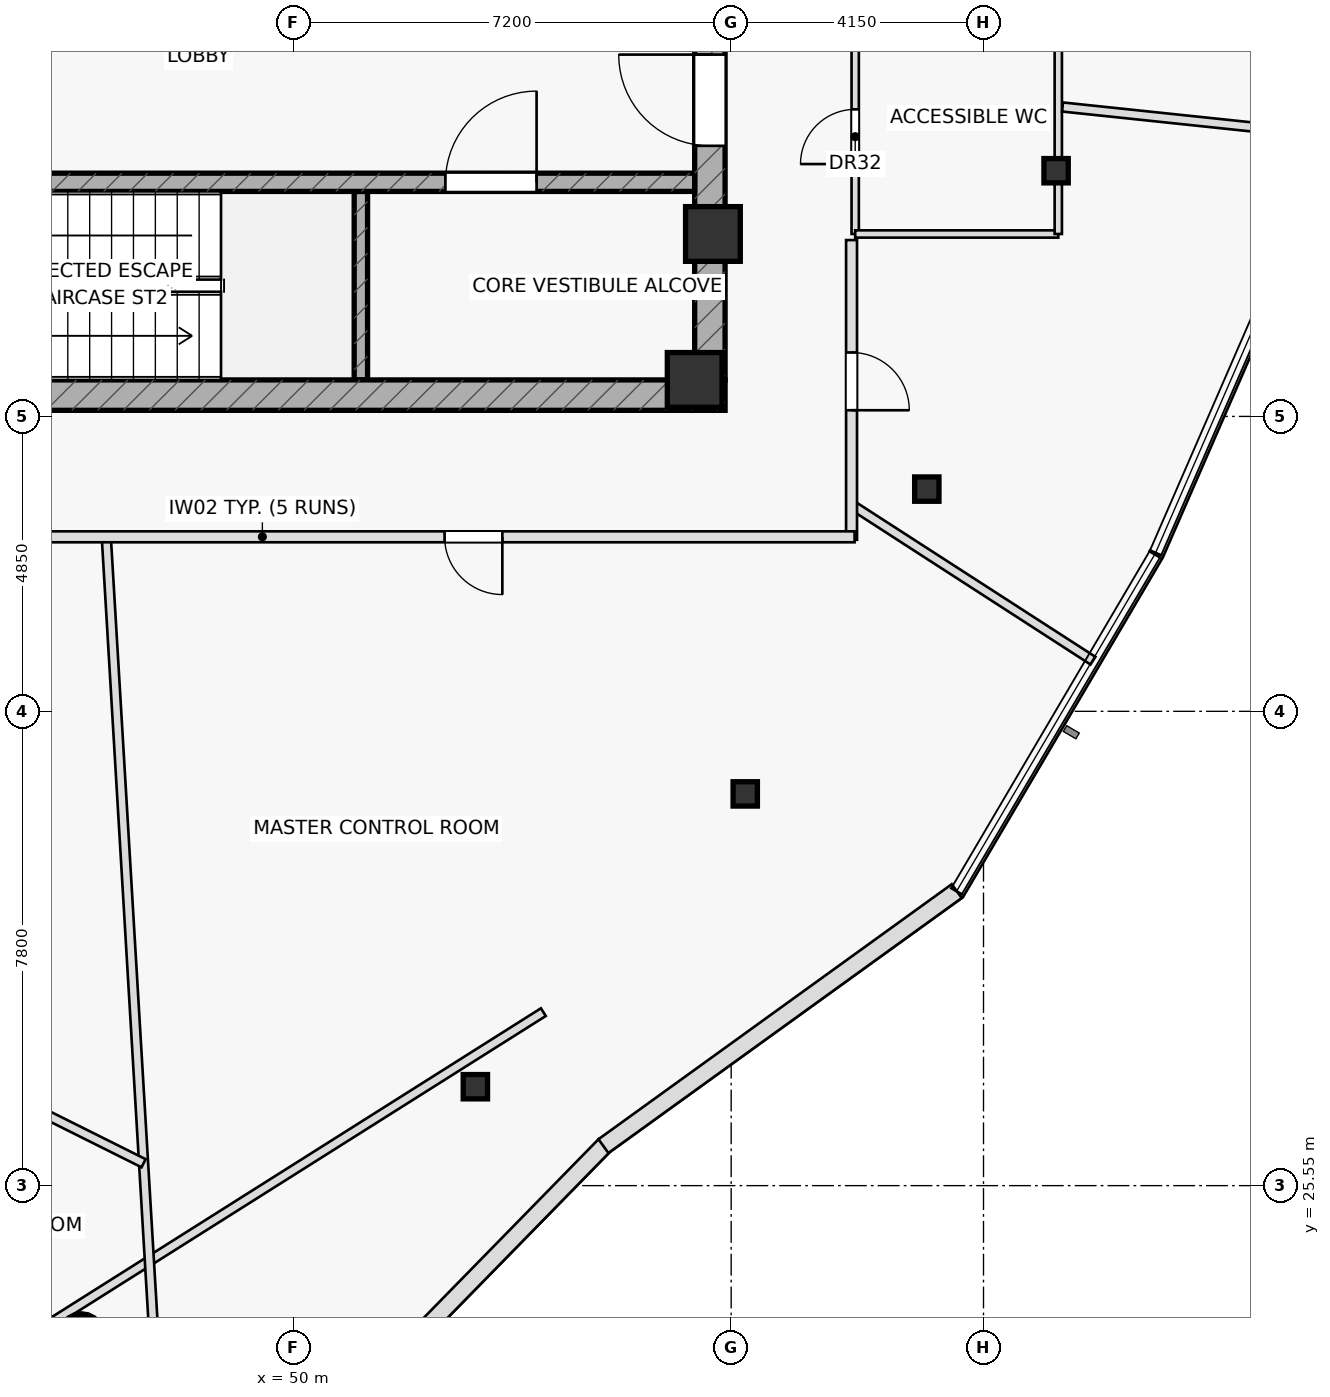
"""IFC4 building model, lengths in metres.
Left out: names, types, materials, properties, quantities, classifications, styles, units other than length and angle.
Written with IfcOpenShell. Run it as: python <this file> out.ifc"""

import sys

from ifc_helpers import new_model, si_unit, direction, frame, frame_2d, origin, origin_2d, place, context, subcontext, project, spatial, rectangle, hollow_rectangle, hollow_circle, extrude, element, fill, save


model = new_model("IFC4")
c1 = context("Model", 3, precision=1e-05, world=origin(), true_north=direction((0.0, 1.0)))
c2 = subcontext(c1, "Body", "Model", "MODEL_VIEW")
j1 = project(units=[si_unit("LENGTHUNIT", "METRE"), si_unit("PLANEANGLEUNIT", "RADIAN")], contexts=[c1])
p1 = place(None, origin())
s1 = spatial("IfcSite", under=j1, at=p1, CompositionType="ELEMENT")
p2 = place(p1, origin())
s2 = spatial("IfcBuilding", under=s1, at=p2, CompositionType="ELEMENT")
p3 = place(p2, frame((0.0, 0.0, 309.5)))
s3 = spatial("IfcBuildingStorey", under=s2, at=p3, CompositionType="ELEMENT", Elevation=309.5)
p4 = place(p3, frame((51.11, 38.8, 0.0), z_axis=(0.0, 0.0, 1.0), x_axis=(0.0, 1.0, 0.0)))
e1 = element("IfcWall", 1, at=p4, inside=s3, PredefinedType="SHEAR", context=c2, shape_type="SweptSolid", body=[
    extrude(rectangle(XDim=3.1, YDim=0.22, at=frame_2d((1.55, 0.0))), origin(), (0.0, 0.0, 1.0), 3.7),
])
p5 = place(p3, frame((42.9, 38.55, 0.0), z_axis=(0.0, 0.0, 1.0), x_axis=(1.0, 0.0, 0.0)))
e2 = element("IfcWall", 2, at=p5, inside=s3, PredefinedType="SHEAR", context=c2, shape_type="SweptSolid", body=[
    extrude(rectangle(XDim=14.2, YDim=0.5, at=frame_2d((7.1, 0.0))), origin(), (0.0, 0.0, 1.0), 3.7),
])
p6 = place(p5, frame((0.78, 0.0, 0.0)))
e3 = element("IfcOpeningElement", 3, at=p6, cuts=e2, PredefinedType="OPENING", context=c2, shape_type="SweptSolid", body=[
    extrude(rectangle(XDim=1.05, YDim=2.2, at=frame_2d((0.525, 1.1))), frame((0.0, 0.26, 0.0), z_axis=(0.0, -1.0, 0.0), x_axis=(1.0, 0.0, 0.0)), (0.0, 0.0, 1.0), 0.52),
])
p7 = place(p3, frame((56.85, 38.8, 0.0), z_axis=(0.0, 0.0, 1.0), x_axis=(0.0, 1.0, 0.0)))
e4 = element("IfcWall", 4, at=p7, inside=s3, PredefinedType="SHEAR", context=c2, shape_type="SweptSolid", body=[
    extrude(rectangle(XDim=12.4, YDim=0.5, at=frame_2d((6.2, 0.0))), origin(), (0.0, 0.0, 1.0), 3.7),
])
p8 = place(p7, frame((3.85, 0.0, 0.0)))
e5 = element("IfcOpeningElement", 5, at=p8, cuts=e4, PredefinedType="OPENING", context=c2, shape_type="SweptSolid", body=[
    extrude(rectangle(XDim=1.5, YDim=2.2, at=frame_2d((0.75, 1.1))), frame((0.0, 0.26, 0.0), z_axis=(0.0, -1.0, 0.0), x_axis=(1.0, 0.0, 0.0)), (0.0, 0.0, 1.0), 0.52),
])
p9 = place(p3, frame((43.4, 42.05, 0.0), z_axis=(0.0, 0.0, 1.0), x_axis=(1.0, 0.0, 0.0)))
e6 = element("IfcWall", 6, at=p9, inside=s3, PredefinedType="SHEAR", context=c2, shape_type="SweptSolid", body=[
    extrude(rectangle(XDim=13.2, YDim=0.3, at=frame_2d((6.6, 0.0))), origin(), (0.0, 0.0, 1.0), 3.7),
])
p10 = place(p9, frame((9.1, 0.0, 0.0)))
e7 = element("IfcOpeningElement", 7, at=p10, cuts=e6, PredefinedType="OPENING", context=c2, shape_type="SweptSolid", body=[
    extrude(rectangle(XDim=1.5, YDim=2.2, at=frame_2d((0.75, 1.1))), frame((0.0, 0.16, 0.0), z_axis=(0.0, -1.0, 0.0), x_axis=(1.0, 0.0, 0.0)), (0.0, 0.0, 1.0), 0.32),
])
for number, where, z_axis, x_axis in (
    (8, (56.9, 41.2, 0.0), (0.0, 0.0, 1.0), (1.0, 0.0, 0.0)),
    (9, (56.6, 38.8, 0.0), (0.0, 0.0, 1.0), (1.0, 0.0, 0.0)),
):
    element("IfcColumn", number, at=place(p3, frame(where, z_axis=z_axis, x_axis=x_axis)), inside=s3, PredefinedType="COLUMN", context=c2, shape_type="SweptSolid", body=[
        extrude(rectangle(XDim=0.9, YDim=0.9, at=origin_2d()), origin(), (0.0, 0.0, 1.0), 3.7),
    ])
p11 = place(p3, frame((46.515, 23.087, 0.0), z_axis=(0.0, 0.0, 1.0), x_axis=(1.0, 0.0, 0.0)))
e10 = element("IfcColumn", 10, at=p11, inside=s3, PredefinedType="COLUMN", context=c2, shape_type="SweptSolid", body=[
    extrude(hollow_circle(Radius=0.355, WallThickness=0.032, at=origin_2d()), origin(), (0.0, 0.0, 1.0), 3.7),
])
for number, where, z_axis, x_axis in (
    (11, (52.993, 27.177, 0.0), (0.0, 0.0, 1.0), (1.0, 0.0, 0.0)),
    (12, (57.431, 31.992, 0.0), (0.0, 0.0, 1.0), (1.0, 0.0, 0.0)),
    (13, (60.417, 37.004, 0.0), (0.0, 0.0, 1.0), (1.0, 0.0, 0.0)),
    (14, (62.544, 42.24, 0.0), (0.0, 0.0, 1.0), (1.0, 0.0, 0.0)),
):
    element("IfcColumn", number, at=place(p3, frame(where, z_axis=z_axis, x_axis=x_axis)), inside=s3, PredefinedType="COLUMN", context=c2, shape_type="SweptSolid", body=[
        extrude(hollow_rectangle(XDim=0.4, YDim=0.4, WallThickness=0.025, at=origin_2d()), origin(), (0.0, 0.0, 1.0), 3.7),
    ])
p12 = place(p3, frame((44.927, 22.605, 0.0), z_axis=(0.0, 0.0, 1.0), x_axis=(0.845624548895, 0.533778158326, 0.0)))
e15 = element("IfcWall", 15, at=p12, inside=s3, PredefinedType="PARTITIONING", context=c2, shape_type="SweptSolid", body=[
    extrude(rectangle(XDim=10.861, YDim=0.15, at=frame_2d((5.431, 0.0))), origin(), (0.0, 0.0, 1.0), 3.225),
])
p13 = place(p3, frame((59.24, 41.2, 0.0), z_axis=(0.0, 0.0, 1.0), x_axis=(0.0, 1.0, 0.0)))
e16 = element("IfcWall", 16, at=p13, inside=s3, PredefinedType="PARTITIONING", context=c2, shape_type="SweptSolid", body=[
    extrude(rectangle(XDim=7.0, YDim=0.12, at=frame_2d((3.5, 0.0))), origin(), (0.0, 0.0, 1.0), 3.7),
])
p14 = place(p13, frame((1.15, 0.0, 0.0)))
e17 = element("IfcOpeningElement", 17, at=p14, cuts=e16, PredefinedType="OPENING", context=c2, shape_type="SweptSolid", body=[
    extrude(rectangle(XDim=0.9, YDim=2.05, at=frame_2d((0.45, 1.025))), frame((0.0, 0.07, 0.0), z_axis=(0.0, -1.0, 0.0), x_axis=(1.0, 0.0, 0.0)), (0.0, 0.0, 1.0), 0.14),
])
p15 = place(p13, frame((4.7, 0.0, 0.0)))
e18 = element("IfcOpeningElement", 18, at=p15, cuts=e16, PredefinedType="OPENING", context=c2, shape_type="SweptSolid", body=[
    extrude(rectangle(XDim=0.9, YDim=2.05, at=frame_2d((0.45, 1.025))), frame((0.0, 0.07, 0.0), z_axis=(0.0, -1.0, 0.0), x_axis=(1.0, 0.0, 0.0)), (0.0, 0.0, 1.0), 0.14),
])
p16 = place(p3, frame((59.24, 41.2, 0.0), z_axis=(0.0, 0.0, 1.0), x_axis=(1.0, 0.0, 0.0)))
e19 = element("IfcWall", 19, at=p16, inside=s3, PredefinedType="PARTITIONING", context=c2, shape_type="SweptSolid", body=[
    extrude(rectangle(XDim=3.34, YDim=0.12, at=frame_2d((1.67, 0.0))), origin(), (0.0, 0.0, 1.0), 3.225),
])
p17 = place(p3, frame((62.58, 41.2, 0.0), z_axis=(0.0, 0.0, 1.0), x_axis=(0.0, 1.0, 0.0)))
e20 = element("IfcWall", 20, at=p17, inside=s3, PredefinedType="PARTITIONING", context=c2, shape_type="SweptSolid", body=[
    extrude(rectangle(XDim=7.0, YDim=0.12, at=frame_2d((3.5, 0.0))), origin(), (0.0, 0.0, 1.0), 3.275),
])
p18 = place(p3, frame((46.923, 36.22, 0.0), z_axis=(0.0, 0.0, 1.0), x_axis=(0.05944180944, -0.998231772331, 0.0)))
e21 = element("IfcWall", 21, at=p18, inside=s3, PredefinedType="PARTITIONING", context=c2, shape_type="SweptSolid", body=[
    extrude(rectangle(XDim=16.125, YDim=0.15, at=frame_2d((8.062, 0.0))), origin(), (0.0, 0.0, 1.0), 3.275),
])
p19 = place(p3, frame((59.18, 36.747, 0.0), z_axis=(0.0, 0.0, 1.0), x_axis=(0.84006046877, -0.542492773049, 0.0)))
e22 = element("IfcWall", 22, at=p19, inside=s3, PredefinedType="PARTITIONING", context=c2, shape_type="SweptSolid", body=[
    extrude(rectangle(XDim=4.726, YDim=0.15, at=frame_2d((2.363, 0.0))), origin(), (0.0, 0.0, 1.0), 3.275),
])
p20 = place(p3, frame((62.65, 43.288, 0.0), z_axis=(0.0, 0.0, 1.0), x_axis=(0.99449896567, -0.104746395075, 0.0)))
e23 = element("IfcWall", 23, at=p20, inside=s3, PredefinedType="PARTITIONING", context=c2, shape_type="SweptSolid", body=[
    extrude(rectangle(XDim=4.125, YDim=0.15, at=frame_2d((2.063, 0.0))), origin(), (0.0, 0.0, 1.0), 3.7),
])
p21 = place(p3, frame((39.137, 30.11, 0.0), z_axis=(0.0, 0.0, 1.0), x_axis=(0.894770249546, -0.446526819493, 0.0)))
e24 = element("IfcWall", 24, at=p21, inside=s3, PredefinedType="PARTITIONING", context=c2, shape_type="SweptSolid", body=[
    extrude(rectangle(XDim=9.387, YDim=0.15, at=frame_2d((4.693, 0.0))), origin(), (0.0, 0.0, 1.0), 3.7),
])
p22 = place(p21, frame((4.218, 0.0, 0.0)))
e25 = element("IfcOpeningElement", 25, at=p22, cuts=e24, PredefinedType="OPENING", context=c2, shape_type="SweptSolid", body=[
    extrude(rectangle(XDim=0.95, YDim=2.05, at=frame_2d((0.475, 1.025))), frame((0.0, 0.085, 0.0), z_axis=(0.0, -1.0, 0.0), x_axis=(1.0, 0.0, 0.0)), (0.0, 0.0, 1.0), 0.17),
])
p23 = place(p3, frame((59.18, 41.1, 0.0), z_axis=(0.0, 0.0, 1.0), x_axis=(0.0, -1.0, 0.0)))
e26 = element("IfcWall", 26, at=p23, inside=s3, PredefinedType="PARTITIONING", context=c2, shape_type="SweptSolid", body=[
    extrude(rectangle(XDim=4.93, YDim=0.18, at=frame_2d((2.465, 0.0))), origin(), (0.0, 0.0, 1.0), 3.475),
])
p24 = place(p23, frame((1.849, 0.0, 0.0)))
e27 = element("IfcOpeningElement", 27, at=p24, cuts=e26, PredefinedType="OPENING", context=c2, shape_type="SweptSolid", body=[
    extrude(rectangle(XDim=0.95, YDim=2.05, at=frame_2d((0.475, 1.025))), frame((0.0, 0.1, 0.0), z_axis=(0.0, -1.0, 0.0), x_axis=(1.0, 0.0, 0.0)), (0.0, 0.0, 1.0), 0.2),
])
p25 = place(p3, frame((59.23, 36.22, 0.0), z_axis=(0.0, 0.0, 1.0), x_axis=(-1.0, 0.0, 0.0)))
e28 = element("IfcWall", 28, at=p25, inside=s3, PredefinedType="PARTITIONING", context=c2, shape_type="SweptSolid", body=[
    extrude(rectangle(XDim=19.48, YDim=0.18, at=frame_2d((9.74, 0.0))), origin(), (0.0, 0.0, 1.0), 3.225),
])
p26 = place(p25, frame((5.793, 0.0, 0.0)))
e29 = element("IfcOpeningElement", 29, at=p26, cuts=e28, PredefinedType="OPENING", context=c2, shape_type="SweptSolid", body=[
    extrude(rectangle(XDim=0.95, YDim=2.05, at=frame_2d((0.475, 1.025))), frame((0.0, 0.1, 0.0), z_axis=(0.0, -1.0, 0.0), x_axis=(1.0, 0.0, 0.0)), (0.0, 0.0, 1.0), 0.2),
])
p27 = place(p25, frame((14.253, 0.0, 0.0)))
e30 = element("IfcOpeningElement", 30, at=p27, cuts=e28, PredefinedType="OPENING", context=c2, shape_type="SweptSolid", body=[
    extrude(rectangle(XDim=0.95, YDim=2.05, at=frame_2d((0.475, 1.025))), frame((0.0, 0.1, 0.0), z_axis=(0.0, -1.0, 0.0), x_axis=(1.0, 0.0, 0.0)), (0.0, 0.0, 1.0), 0.2),
])
p28 = place(p3, frame((50.566, 21.562, 0.0), z_axis=(0.0, 0.0, 1.0), x_axis=(0.699363672828, 0.714766012852, 0.0)))
e31 = element("IfcWall", 31, at=p28, inside=s3, PredefinedType="STANDARD", context=c2, shape_type="SweptSolid", body=[
    extrude(rectangle(XDim=6.515, YDim=0.28, at=frame_2d((3.257, 0.0))), origin(), (0.0, 0.0, 1.0), 3.7),
])
p29 = place(p3, frame((55.1, 26.2, 0.0), z_axis=(0.0, 0.0, 1.0), x_axis=(0.810855275332, 0.585246719313, 0.0)))
e32 = element("IfcWall", 32, at=p29, inside=s3, PredefinedType="STANDARD", context=c2, shape_type="SweptSolid", body=[
    extrude(rectangle(XDim=7.166, YDim=0.28, at=frame_2d((3.583, 0.0))), origin(), (0.0, 0.0, 1.0), 3.7),
])
p30 = place(p8, origin())
e33 = element("IfcDoor", 33, at=p30, inside=s3, OperationType="SINGLE_SWING_RIGHT", PredefinedType="DOOR", context=c2, shape_type="SweptSolid", body=[
    extrude(rectangle(XDim=1.5, YDim=2.2, at=frame_2d((0.75, 1.1))), frame((0.0, 0.025, 0.0), z_axis=(0.0, -1.0, 0.0), x_axis=(1.0, 0.0, 0.0)), (0.0, 0.0, 1.0), 0.05),
])
fill(e5, e33)
p31 = place(p10, origin())
e34 = element("IfcDoor", 34, at=p31, inside=s3, OperationType="SINGLE_SWING_RIGHT", PredefinedType="DOOR", context=c2, shape_type="SweptSolid", body=[
    extrude(rectangle(XDim=1.5, YDim=2.2, at=frame_2d((0.75, 1.1))), frame((0.0, 0.025, 0.0), z_axis=(0.0, -1.0, 0.0), x_axis=(1.0, 0.0, 0.0)), (0.0, 0.0, 1.0), 0.05),
])
fill(e7, e34)
p32 = place(p14, origin())
e35 = element("IfcDoor", 35, at=p32, inside=s3, OperationType="SINGLE_SWING_LEFT", PredefinedType="DOOR", context=c2, shape_type="SweptSolid", body=[
    extrude(rectangle(XDim=0.9, YDim=2.05, at=frame_2d((0.45, 1.025))), frame((0.0, 0.025, 0.0), z_axis=(0.0, -1.0, 0.0), x_axis=(1.0, 0.0, 0.0)), (0.0, 0.0, 1.0), 0.05),
])
fill(e17, e35)
p33 = place(p24, origin())
e36 = element("IfcDoor", 36, at=p33, inside=s3, OperationType="SINGLE_SWING_RIGHT", PredefinedType="DOOR", context=c2, shape_type="SweptSolid", body=[
    extrude(rectangle(XDim=0.95, YDim=2.05, at=frame_2d((0.475, 1.025))), frame((0.0, 0.025, 0.0), z_axis=(0.0, -1.0, 0.0), x_axis=(1.0, 0.0, 0.0)), (0.0, 0.0, 1.0), 0.05),
])
fill(e27, e36)
p34 = place(p26, origin())
e37 = element("IfcDoor", 37, at=p34, inside=s3, OperationType="SINGLE_SWING_LEFT", PredefinedType="DOOR", context=c2, shape_type="SweptSolid", body=[
    extrude(rectangle(XDim=0.95, YDim=2.05, at=frame_2d((0.475, 1.025))), frame((0.0, 0.025, 0.0), z_axis=(0.0, -1.0, 0.0), x_axis=(1.0, 0.0, 0.0)), (0.0, 0.0, 1.0), 0.05),
])
fill(e29, e37)
save(model, sys.argv[1])
